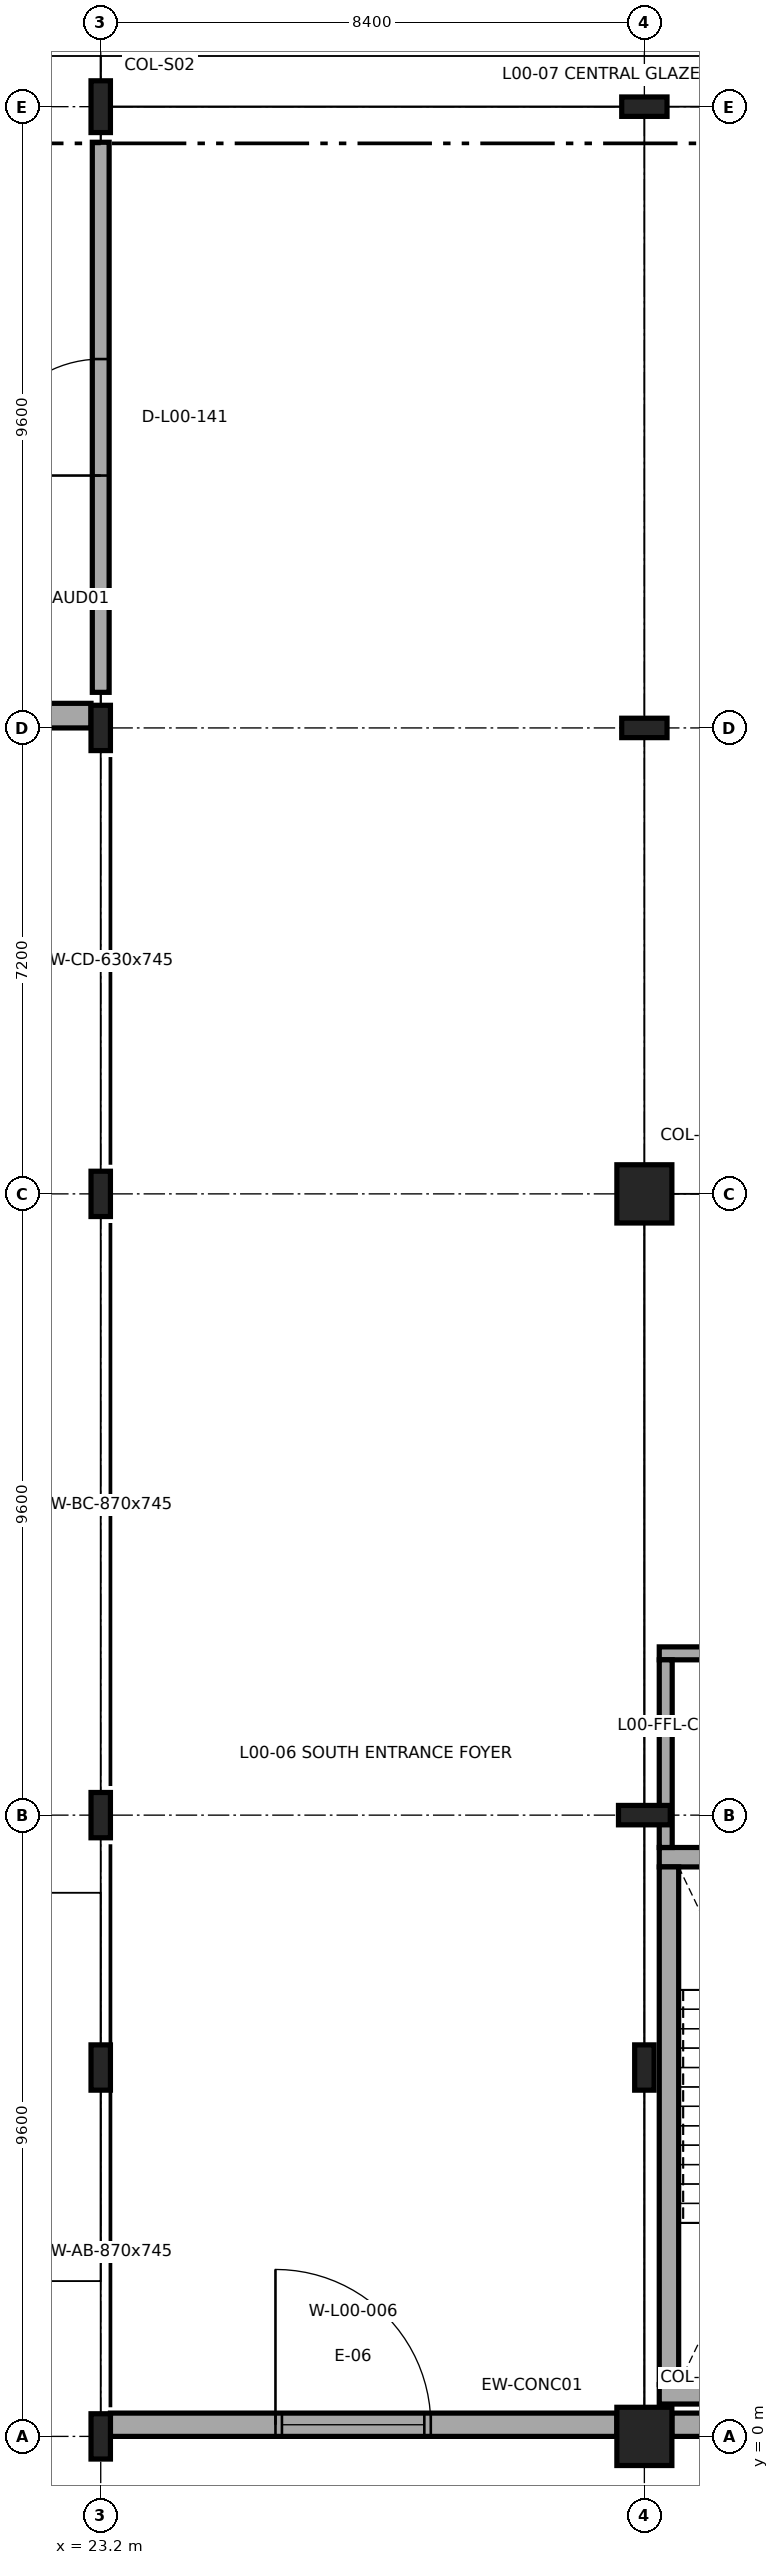
"""IFC4 building model, lengths in metres.
Left out: names, types, materials, properties, quantities, classifications, styles, units other than length and angle.
Written with IfcOpenShell. Run it as: python <this file> out.ifc"""

import sys

from ifc_helpers import new_model, si_unit, direction, frame, frame_2d, origin, origin_2d, place, context, subcontext, project, spatial, rectangle, i_section, extrude, element, fill, save


model = new_model("IFC4")
c1 = context("Model", 3, precision=1e-05, world=origin(), true_north=direction((0.0, 1.0)))
c2 = subcontext(c1, "Body", "Model", "MODEL_VIEW")
j1 = project(units=[si_unit("LENGTHUNIT", "METRE"), si_unit("PLANEANGLEUNIT", "RADIAN")], contexts=[c1])
p1 = place(None, origin())
s1 = spatial("IfcSite", under=j1, at=p1, CompositionType="ELEMENT")
p2 = place(p1, origin())
s2 = spatial("IfcBuilding", under=s1, at=p2, CompositionType="ELEMENT")
p3 = place(p2, origin())
s3 = spatial("IfcBuildingStorey", under=s2, at=p3, CompositionType="ELEMENT", Elevation=0.0)
for number, where, z_axis, x_axis in (
    (1, (23.2, 0.0, 0.0), (0.0, 0.0, 1.0), (1.0, 0.0, 0.0)),
    (2, (23.2, 9.6, 0.0), (0.0, 0.0, 1.0), (1.0, 0.0, 0.0)),
    (3, (23.2, 19.2, 0.0), (0.0, 0.0, 1.0), (1.0, 0.0, 0.0)),
    (4, (23.2, 26.4, 0.0), (0.0, 0.0, 1.0), (1.0, 0.0, 0.0)),
):
    element("IfcColumn", number, at=place(p3, frame(where, z_axis=z_axis, x_axis=x_axis)), inside=s3, PredefinedType="COLUMN", context=c2, shape_type="SweptSolid", body=[
        extrude(i_section(OverallWidth=0.3, OverallDepth=0.7, WebThickness=0.017, FlangeThickness=0.032, FilletRadius=0.027, at=origin_2d()), origin(), (0.0, 0.0, 1.0), 8.4),
    ])
p4 = place(p3, frame((23.2, 36.0, 0.0), z_axis=(0.0, 0.0, 1.0), x_axis=(1.0, 0.0, 0.0)))
e5 = element("IfcColumn", 5, at=p4, inside=s3, PredefinedType="COLUMN", context=c2, shape_type="SweptSolid", body=[
    extrude(i_section(OverallWidth=0.3, OverallDepth=0.8, WebThickness=0.018, FlangeThickness=0.033, FilletRadius=0.03, at=origin_2d()), origin(), (0.0, 0.0, 1.0), 8.4),
])
p5 = place(p3, frame((31.6, 0.0, 0.0), z_axis=(0.0, 0.0, 1.0), x_axis=(1.0, 0.0, 0.0)))
e6 = element("IfcColumn", 6, at=p5, inside=s3, PredefinedType="COLUMN", context=c2, shape_type="SweptSolid", body=[
    extrude(rectangle(XDim=0.85, YDim=0.9, at=origin_2d()), origin(), (0.0, 0.0, 1.0), 8.4),
])
p6 = place(p3, frame((31.6, 9.6, 0.0), z_axis=(0.0, 0.0, 1.0), x_axis=(0.0, 1.0, 0.0)))
e7 = element("IfcColumn", 7, at=p6, inside=s3, PredefinedType="COLUMN", context=c2, shape_type="SweptSolid", body=[
    extrude(i_section(OverallWidth=0.3, OverallDepth=0.8, WebThickness=0.018, FlangeThickness=0.033, FilletRadius=0.03, at=origin_2d()), origin(), (0.0, 0.0, 1.0), 8.4),
])
p7 = place(p3, frame((31.6, 19.2, 0.0), z_axis=(0.0, 0.0, 1.0), x_axis=(1.0, 0.0, 0.0)))
e8 = element("IfcColumn", 8, at=p7, inside=s3, PredefinedType="COLUMN", context=c2, shape_type="SweptSolid", body=[
    extrude(rectangle(XDim=0.85, YDim=0.9, at=origin_2d()), origin(), (0.0, 0.0, 1.0), 8.4),
])
for number, where, z_axis, x_axis in (
    (9, (31.6, 26.4, 0.0), (0.0, 0.0, 1.0), (0.0, 1.0, 0.0)),
    (10, (31.6, 36.0, 0.0), (0.0, 0.0, 1.0), (0.0, 1.0, 0.0)),
    (11, (23.2, 5.7, 0.0), (0.0, 0.0, 1.0), (1.0, 0.0, 0.0)),
    (12, (31.6, 5.7, 0.0), (0.0, 0.0, 1.0), (1.0, 0.0, 0.0)),
):
    element("IfcColumn", number, at=place(p3, frame(where, z_axis=z_axis, x_axis=x_axis)), inside=s3, PredefinedType="COLUMN", context=c2, shape_type="SweptSolid", body=[
        extrude(i_section(OverallWidth=0.3, OverallDepth=0.7, WebThickness=0.017, FlangeThickness=0.032, FilletRadius=0.027, at=origin_2d()), origin(), (0.0, 0.0, 1.0), 8.4),
    ])
p8 = place(p3, frame((32.025, 0.18, 0.0), z_axis=(0.0, 0.0, 1.0), x_axis=(1.0, 0.0, 0.0)))
e13 = element("IfcWall", 13, at=p8, inside=s3, PredefinedType="SOLIDWALL", context=c2, shape_type="SweptSolid", body=[
    extrude(rectangle(XDim=7.55, YDim=0.36, at=frame_2d((3.775, 0.0))), origin(), (0.0, 0.0, 1.0), 7.235),
])
p9 = place(p3, frame((23.35, 0.18, 0.0), z_axis=(0.0, 0.0, 1.0), x_axis=(1.0, 0.0, 0.0)))
e14 = element("IfcWall", 14, at=p9, inside=s3, PredefinedType="SOLIDWALL", context=c2, shape_type="SweptSolid", body=[
    extrude(rectangle(XDim=7.825, YDim=0.36, at=frame_2d((3.913, 0.0))), origin(), (0.0, 0.0, 1.0), 7.45),
])
p10 = place(p9, frame((2.55, 0.0, 0.0)))
e15 = element("IfcOpeningElement", 15, at=p10, cuts=e14, PredefinedType="OPENING", context=c2, shape_type="SweptSolid", body=[
    extrude(rectangle(XDim=2.4, YDim=2.6, at=frame_2d((1.2, 1.3))), frame((0.0, 0.19, 0.0), z_axis=(0.0, -1.0, 0.0), x_axis=(1.0, 0.0, 0.0)), (0.0, 0.0, 1.0), 0.38),
])
p11 = place(p9, frame((2.65, 0.0, 2.9)))
e16 = element("IfcOpeningElement", 16, at=p11, cuts=e14, PredefinedType="OPENING", context=c2, shape_type="SweptSolid", body=[
    extrude(rectangle(XDim=2.2, YDim=4.2, at=frame_2d((1.1, 2.1))), frame((0.0, 0.19, 0.0), z_axis=(0.0, -1.0, 0.0), x_axis=(1.0, 0.0, 0.0)), (0.0, 0.0, 1.0), 0.38),
])
p12 = place(p3, frame((14.95, 26.59, 0.0), z_axis=(0.0, 0.0, 1.0), x_axis=(1.0, 0.0, 0.0)))
e17 = element("IfcWall", 17, at=p12, inside=s3, PredefinedType="SOLIDWALL", context=c2, shape_type="SweptSolid", body=[
    extrude(rectangle(XDim=8.1, YDim=0.38, at=frame_2d((4.05, 0.0))), origin(), (0.0, 0.0, 1.0), 7.78),
])
p13 = place(p3, frame((31.83, 0.65, 0.0), z_axis=(0.0, 0.0, 1.0), x_axis=(1.0, 0.0, 0.0)))
e18 = element("IfcWall", 18, at=p13, inside=s3, PredefinedType="SHEAR", context=c2, shape_type="SweptSolid", body=[
    extrude(rectangle(XDim=7.94, YDim=0.3, at=frame_2d((3.97, 0.0))), origin(), (0.0, 0.0, 1.0), 8.15),
])
p14 = place(p3, frame((39.77, 8.95, 0.0), z_axis=(0.0, 0.0, 1.0), x_axis=(-1.0, 0.0, 0.0)))
e19 = element("IfcWall", 19, at=p14, inside=s3, PredefinedType="SHEAR", context=c2, shape_type="SweptSolid", body=[
    extrude(rectangle(XDim=7.94, YDim=0.3, at=frame_2d((3.97, 0.0))), origin(), (0.0, 0.0, 1.0), 8.15),
])
p15 = place(p14, frame((5.17, 0.0, 0.0)))
e20 = element("IfcOpeningElement", 20, at=p15, cuts=e19, PredefinedType="OPENING", context=c2, shape_type="SweptSolid", body=[
    extrude(rectangle(XDim=1.1, YDim=2.2, at=frame_2d((0.55, 1.1))), frame((0.0, 0.16, 0.0), z_axis=(0.0, -1.0, 0.0), x_axis=(1.0, 0.0, 0.0)), (0.0, 0.0, 1.0), 0.32),
])
p16 = place(p14, frame((2.09, 0.0, 0.0)))
e21 = element("IfcOpeningElement", 21, at=p16, cuts=e19, PredefinedType="OPENING", context=c2, shape_type="SweptSolid", body=[
    extrude(rectangle(XDim=1.1, YDim=2.1, at=frame_2d((0.55, 1.05))), frame((0.0, 0.16, 0.0), z_axis=(0.0, -1.0, 0.0), x_axis=(1.0, 0.0, 0.0)), (0.0, 0.0, 1.0), 0.32),
])
p17 = place(p14, frame((0.365, 0.0, 0.0)))
e22 = element("IfcOpeningElement", 22, at=p17, cuts=e19, PredefinedType="OPENING", context=c2, shape_type="SweptSolid", body=[
    extrude(rectangle(XDim=1.1, YDim=2.1, at=frame_2d((0.55, 1.05))), frame((0.0, 0.16, 0.0), z_axis=(0.0, -1.0, 0.0), x_axis=(1.0, 0.0, 0.0)), (0.0, 0.0, 1.0), 0.32),
])
p18 = place(p3, frame((31.98, 8.8, 0.0), z_axis=(0.0, 0.0, 1.0), x_axis=(0.0, -1.0, 0.0)))
e23 = element("IfcWall", 23, at=p18, inside=s3, PredefinedType="SHEAR", context=c2, shape_type="SweptSolid", body=[
    extrude(rectangle(XDim=8.0, YDim=0.3, at=frame_2d((4.0, 0.0))), origin(), (0.0, 0.0, 1.0), 8.15),
])
p19 = place(p3, frame((31.83, 12.1, 0.0), z_axis=(0.0, 0.0, 1.0), x_axis=(1.0, 0.0, 0.0)))
e24 = element("IfcWall", 24, at=p19, inside=s3, PredefinedType="SOLIDWALL", context=c2, shape_type="SweptSolid", body=[
    extrude(rectangle(XDim=11.47, YDim=0.2, at=frame_2d((5.735, 0.0))), origin(), (0.0, 0.0, 1.0), 7.532),
])
p20 = place(p19, frame((3.07, 0.0, 0.0)))
e25 = element("IfcOpeningElement", 25, at=p20, cuts=e24, PredefinedType="OPENING", context=c2, shape_type="SweptSolid", body=[
    extrude(rectangle(XDim=1.8, YDim=2.2, at=frame_2d((0.9, 1.1))), frame((0.0, 0.11, 0.0), z_axis=(0.0, -1.0, 0.0), x_axis=(1.0, 0.0, 0.0)), (0.0, 0.0, 1.0), 0.22),
])
p21 = place(p3, frame((31.93, 9.1, 0.0), z_axis=(0.0, 0.0, 1.0), x_axis=(0.0, 1.0, 0.0)))
e26 = element("IfcWall", 26, at=p21, inside=s3, PredefinedType="SOLIDWALL", context=c2, shape_type="SweptSolid", body=[
    extrude(rectangle(XDim=2.9, YDim=0.2, at=frame_2d((1.45, 0.0))), origin(), (0.0, 0.0, 1.0), 7.582),
])
p22 = place(p3, frame((23.2, 26.95, 0.0), z_axis=(0.0, 0.0, 1.0), x_axis=(0.0, 1.0, 0.0)))
e27 = element("IfcWall", 27, at=p22, inside=s3, PredefinedType="PARTITIONING", context=c2, shape_type="SweptSolid", body=[
    extrude(rectangle(XDim=8.5, YDim=0.26, at=frame_2d((4.25, 0.0))), origin(), (0.0, 0.0, 1.0), 7.812),
])
p23 = place(p22, frame((3.35, 0.0, 0.0)))
e28 = element("IfcOpeningElement", 28, at=p23, cuts=e27, PredefinedType="OPENING", context=c2, shape_type="SweptSolid", body=[
    extrude(rectangle(XDim=1.8, YDim=2.3, at=frame_2d((0.9, 1.15))), frame((0.0, 0.14, 0.0), z_axis=(0.0, -1.0, 0.0), x_axis=(1.0, 0.0, 0.0)), (0.0, 0.0, 1.0), 0.28),
])
p24 = place(p10, frame((2.4, 0.0, 0.0), z_axis=(0.0, 0.0, 1.0), x_axis=(-1.0, 0.0, 0.0)))
e29 = element("IfcDoor", 29, at=p24, inside=s3, OperationType="DOUBLE_DOOR_SINGLE_SWING", PredefinedType="DOOR", context=c2, shape_type="SweptSolid", body=[
    extrude(rectangle(XDim=2.4, YDim=2.6, at=frame_2d((1.2, 1.3))), frame((0.0, 0.025, 0.0), z_axis=(0.0, -1.0, 0.0), x_axis=(1.0, 0.0, 0.0)), (0.0, 0.0, 1.0), 0.05),
])
fill(e15, e29)
p25 = place(p11, origin())
e30 = element("IfcWindow", 30, at=p25, inside=s3, PartitioningType="SINGLE_PANEL", PredefinedType="WINDOW", context=c2, shape_type="SweptSolid", body=[
    extrude(rectangle(XDim=2.2, YDim=4.2, at=frame_2d((1.1, 2.1))), frame((0.0, 0.03, 0.0), z_axis=(0.0, -1.0, 0.0), x_axis=(1.0, 0.0, 0.0)), (0.0, 0.0, 1.0), 0.06),
])
fill(e16, e30)
p26 = place(p23, origin())
e31 = element("IfcDoor", 31, at=p26, inside=s3, OperationType="DOUBLE_DOOR_SINGLE_SWING", PredefinedType="DOOR", context=c2, shape_type="SweptSolid", body=[
    extrude(rectangle(XDim=1.8, YDim=2.3, at=frame_2d((0.9, 1.15))), frame((0.0, 0.025, 0.0), z_axis=(0.0, -1.0, 0.0), x_axis=(1.0, 0.0, 0.0)), (0.0, 0.0, 1.0), 0.05),
])
fill(e28, e31)
save(model, sys.argv[1])
